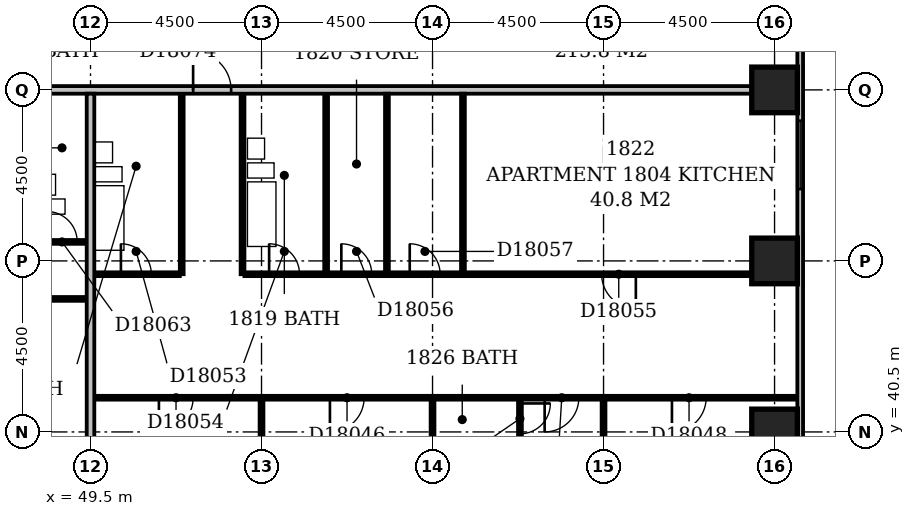
"""IFC4 building model, lengths in metres.
Left out: names, types, materials, properties, quantities, classifications, styles, units other than length and angle.
Written with IfcOpenShell. Run it as: python <this file> out.ifc"""

import sys

from ifc_helpers import new_model, si_unit, direction, frame, frame_2d, origin, origin_2d, place, context, subcontext, project, spatial, rectangle, extrude, element, fill, save


model = new_model("IFC4")
c1 = context("Model", 3, precision=1e-05, world=origin(), true_north=direction((0.0, 1.0)))
c2 = subcontext(c1, "Body", "Model", "MODEL_VIEW")
j1 = project(units=[si_unit("LENGTHUNIT", "METRE"), si_unit("PLANEANGLEUNIT", "RADIAN")], contexts=[c1])
p1 = place(None, origin())
s1 = spatial("IfcSite", under=j1, at=p1, CompositionType="ELEMENT")
p2 = place(p1, origin())
s2 = spatial("IfcBuilding", under=s1, at=p2, CompositionType="ELEMENT")
p3 = place(p2, frame((0.0, 0.0, 75.8)))
s3 = spatial("IfcBuildingStorey", under=s2, at=p3, CompositionType="ELEMENT", Elevation=75.8)
for number, where, z_axis, x_axis in (
    (1, (67.5, 40.5, -0.3), (0.0, 0.0, 1.0), (1.0, 0.0, 0.0)),
    (2, (67.5, 45.0, -0.3), (0.0, 0.0, 1.0), (1.0, 0.0, 0.0)),
    (3, (67.5, 49.5, -0.3), (0.0, 0.0, 1.0), (1.0, 0.0, 0.0)),
):
    element("IfcColumn", number, at=place(p3, frame(where, z_axis=z_axis, x_axis=x_axis)), inside=s3, PredefinedType="COLUMN", context=c2, shape_type="SweptSolid", body=[
        extrude(rectangle(XDim=1.2, YDim=1.2, at=origin_2d()), origin(), (0.0, 0.0, 1.0), 3.6),
    ])
p4 = place(p3, frame((68.175, 35.4, 0.0), z_axis=(0.0, 0.0, 1.0), x_axis=(0.0, 1.0, 0.0)))
e4 = element("IfcWall", 4, at=p4, inside=s3, PredefinedType="STANDARD", context=c2, shape_type="SweptSolid", body=[
    extrude(rectangle(XDim=23.85, YDim=0.15, at=frame_2d((11.925, 0.0))), origin(), (0.0, 0.0, 1.0), 2.7),
])
p5 = place(p4, frame((1.65, 0.0, 0.6)))
e5 = element("IfcOpeningElement", 5, at=p5, cuts=e4, PredefinedType="OPENING", context=c2, shape_type="SweptSolid", body=[
    extrude(rectangle(XDim=2.4, YDim=1.8, at=frame_2d((1.2, 0.9))), frame((0.0, 0.087, 0.0), z_axis=(0.0, -1.0, 0.0), x_axis=(1.0, 0.0, 0.0)), (0.0, 0.0, 1.0), 0.174),
])
p6 = place(p4, frame((11.49, 0.0, 0.6)))
e6 = element("IfcOpeningElement", 6, at=p6, cuts=e4, PredefinedType="OPENING", context=c2, shape_type="SweptSolid", body=[
    extrude(rectangle(XDim=1.8, YDim=1.8, at=frame_2d((0.9, 0.9))), frame((0.0, 0.087, 0.0), z_axis=(0.0, -1.0, 0.0), x_axis=(1.0, 0.0, 0.0)), (0.0, 0.0, 1.0), 0.174),
])
p7 = place(p4, frame((19.65, 0.0, 0.6)))
e7 = element("IfcOpeningElement", 7, at=p7, cuts=e4, PredefinedType="OPENING", context=c2, shape_type="SweptSolid", body=[
    extrude(rectangle(XDim=2.4, YDim=1.8, at=frame_2d((1.2, 0.9))), frame((0.0, 0.087, 0.0), z_axis=(0.0, -1.0, 0.0), x_axis=(1.0, 0.0, 0.0)), (0.0, 0.0, 1.0), 0.174),
])
p8 = place(p3, frame((49.5, 36.6, 0.0), z_axis=(0.0, 0.0, 1.0), x_axis=(0.0, 1.0, 0.0)))
e8 = element("IfcWall", 8, at=p8, inside=s3, PredefinedType="PARTITIONING", context=c2, shape_type="SweptSolid", body=[
    extrude(rectangle(XDim=12.8, YDim=0.2, at=frame_2d((6.4, 0.0))), origin(), (0.0, 0.0, 1.0), 3.3),
])
p9 = place(p3, frame((54.0, 36.6, 0.0), z_axis=(0.0, 0.0, 1.0), x_axis=(0.0, 1.0, 0.0)))
e9 = element("IfcWall", 9, at=p9, inside=s3, PredefinedType="PARTITIONING", context=c2, shape_type="SweptSolid", body=[
    extrude(rectangle(XDim=4.75, YDim=0.1, at=frame_2d((2.375, 0.0))), origin(), (0.0, 0.0, 1.0), 2.6),
])
p10 = place(p3, frame((58.5, 36.6, 0.0), z_axis=(0.0, 0.0, 1.0), x_axis=(0.0, 1.0, 0.0)))
e10 = element("IfcWall", 10, at=p10, inside=s3, PredefinedType="PARTITIONING", context=c2, shape_type="SweptSolid", body=[
    extrude(rectangle(XDim=4.75, YDim=0.1, at=frame_2d((2.375, 0.0))), origin(), (0.0, 0.0, 1.0), 3.3),
])
p11 = place(p3, frame((63.0, 36.6, 0.0), z_axis=(0.0, 0.0, 1.0), x_axis=(0.0, 1.0, 0.0)))
e11 = element("IfcWall", 11, at=p11, inside=s3, PredefinedType="PARTITIONING", context=c2, shape_type="SweptSolid", body=[
    extrude(rectangle(XDim=4.75, YDim=0.1, at=frame_2d((2.375, 0.0))), origin(), (0.0, 0.0, 1.0), 2.4),
])
p12 = place(p3, frame((60.8, 40.25, 0.0), z_axis=(0.0, 0.0, 1.0), x_axis=(0.0, 1.0, 0.0)))
e12 = element("IfcWall", 12, at=p12, inside=s3, PredefinedType="PLUMBINGWALL", context=c2, shape_type="SweptSolid", body=[
    extrude(rectangle(XDim=1.1, YDim=0.1, at=frame_2d((0.55, 0.0))), origin(), (0.0, 0.0, 1.0), 3.3),
])
p13 = place(p12, frame((0.2, 0.0, 0.0)))
e13 = element("IfcOpeningElement", 13, at=p13, cuts=e12, PredefinedType="OPENING", context=c2, shape_type="SweptSolid", body=[
    extrude(rectangle(XDim=0.8, YDim=2.1, at=frame_2d((0.4, 1.05))), frame((0.0, 0.062, 0.0), z_axis=(0.0, -1.0, 0.0), x_axis=(1.0, 0.0, 0.0)), (0.0, 0.0, 1.0), 0.124),
])
p14 = place(p3, frame((49.6, 41.4, 0.0), z_axis=(0.0, 0.0, 1.0), x_axis=(1.0, 0.0, 0.0)))
e14 = element("IfcWall", 14, at=p14, inside=s3, PredefinedType="PARTITIONING", context=c2, shape_type="SweptSolid", body=[
    extrude(rectangle(XDim=18.5, YDim=0.1, at=frame_2d((9.25, 0.0))), origin(), (0.0, 0.0, 1.0), 3.3),
])
p15 = place(p14, frame((1.7, 0.0, 0.0)))
e15 = element("IfcOpeningElement", 15, at=p15, cuts=e14, PredefinedType="OPENING", context=c2, shape_type="SweptSolid", body=[
    extrude(rectangle(XDim=0.9, YDim=2.1, at=frame_2d((0.45, 1.05))), frame((0.0, 0.062, 0.0), z_axis=(0.0, -1.0, 0.0), x_axis=(1.0, 0.0, 0.0)), (0.0, 0.0, 1.0), 0.124),
])
p16 = place(p14, frame((6.2, 0.0, 0.0)))
e16 = element("IfcOpeningElement", 16, at=p16, cuts=e14, PredefinedType="OPENING", context=c2, shape_type="SweptSolid", body=[
    extrude(rectangle(XDim=0.9, YDim=2.1, at=frame_2d((0.45, 1.05))), frame((0.0, 0.062, 0.0), z_axis=(0.0, -1.0, 0.0), x_axis=(1.0, 0.0, 0.0)), (0.0, 0.0, 1.0), 0.124),
])
p17 = place(p14, frame((11.85, 0.0, 0.0)))
e17 = element("IfcOpeningElement", 17, at=p17, cuts=e14, PredefinedType="OPENING", context=c2, shape_type="SweptSolid", body=[
    extrude(rectangle(XDim=0.9, YDim=2.1, at=frame_2d((0.45, 1.05))), frame((0.0, 0.062, 0.0), z_axis=(0.0, -1.0, 0.0), x_axis=(1.0, 0.0, 0.0)), (0.0, 0.0, 1.0), 0.124),
])
p18 = place(p14, frame((15.2, 0.0, 0.0)))
e18 = element("IfcOpeningElement", 18, at=p18, cuts=e14, PredefinedType="OPENING", context=c2, shape_type="SweptSolid", body=[
    extrude(rectangle(XDim=0.9, YDim=2.1, at=frame_2d((0.45, 1.05))), frame((0.0, 0.062, 0.0), z_axis=(0.0, -1.0, 0.0), x_axis=(1.0, 0.0, 0.0)), (0.0, 0.0, 1.0), 0.124),
])
p19 = place(p3, frame((36.1, 44.0, 0.0), z_axis=(0.0, 0.0, 1.0), x_axis=(1.0, 0.0, 0.0)))
e19 = element("IfcWall", 19, at=p19, inside=s3, PredefinedType="PARTITIONING", context=c2, shape_type="SweptSolid", body=[
    extrude(rectangle(XDim=13.3, YDim=0.1, at=frame_2d((6.65, 0.0))), origin(), (0.0, 0.0, 1.0), 3.3),
])
p20 = place(p19, frame((3.9, 0.0, 0.0)))
e20 = element("IfcOpeningElement", 20, at=p20, cuts=e19, PredefinedType="OPENING", context=c2, shape_type="SweptSolid", body=[
    extrude(rectangle(XDim=0.9, YDim=2.1, at=frame_2d((0.45, 1.05))), frame((0.0, 0.062, 0.0), z_axis=(0.0, -1.0, 0.0), x_axis=(1.0, 0.0, 0.0)), (0.0, 0.0, 1.0), 0.124),
])
p21 = place(p19, frame((10.7, 0.0, 0.0)))
e21 = element("IfcOpeningElement", 21, at=p21, cuts=e19, PredefinedType="OPENING", context=c2, shape_type="SweptSolid", body=[
    extrude(rectangle(XDim=0.9, YDim=2.1, at=frame_2d((0.45, 1.05))), frame((0.0, 0.062, 0.0), z_axis=(0.0, -1.0, 0.0), x_axis=(1.0, 0.0, 0.0)), (0.0, 0.0, 1.0), 0.124),
])
p22 = place(p3, frame((49.6, 44.65, 0.0), z_axis=(0.0, 0.0, 1.0), x_axis=(1.0, 0.0, 0.0)))
e22 = element("IfcWall", 22, at=p22, inside=s3, PredefinedType="PARTITIONING", context=c2, shape_type="SweptSolid", body=[
    extrude(rectangle(XDim=2.25, YDim=0.1, at=frame_2d((1.125, 0.0))), origin(), (0.0, 0.0, 1.0), 3.3),
])
p23 = place(p22, frame((0.7, 0.0, 0.0)))
e23 = element("IfcOpeningElement", 23, at=p23, cuts=e22, PredefinedType="OPENING", context=c2, shape_type="SweptSolid", body=[
    extrude(rectangle(XDim=0.8, YDim=2.1, at=frame_2d((0.4, 1.05))), frame((0.0, 0.062, 0.0), z_axis=(0.0, -1.0, 0.0), x_axis=(1.0, 0.0, 0.0)), (0.0, 0.0, 1.0), 0.124),
])
p24 = place(p3, frame((51.9, 44.65, 0.0), z_axis=(0.0, 0.0, 1.0), x_axis=(0.0, 1.0, 0.0)))
e24 = element("IfcWall", 24, at=p24, inside=s3, PredefinedType="PLUMBINGWALL", context=c2, shape_type="SweptSolid", body=[
    extrude(rectangle(XDim=4.75, YDim=0.1, at=frame_2d((2.375, 0.0))), origin(), (0.0, 0.0, 1.0), 3.3),
])
p25 = place(p3, frame((53.5, 44.65, 0.0), z_axis=(0.0, 0.0, 1.0), x_axis=(0.0, 1.0, 0.0)))
e25 = element("IfcWall", 25, at=p25, inside=s3, PredefinedType="PLUMBINGWALL", context=c2, shape_type="SweptSolid", body=[
    extrude(rectangle(XDim=4.75, YDim=0.1, at=frame_2d((2.375, 0.0))), origin(), (0.0, 0.0, 1.0), 2.6),
])
p26 = place(p3, frame((53.55, 44.65, 0.0), z_axis=(0.0, 0.0, 1.0), x_axis=(1.0, 0.0, 0.0)))
e26 = element("IfcWall", 26, at=p26, inside=s3, PredefinedType="PARTITIONING", context=c2, shape_type="SweptSolid", body=[
    extrude(rectangle(XDim=13.35, YDim=0.1, at=frame_2d((6.675, 0.0))), origin(), (0.0, 0.0, 1.0), 3.3),
])
p27 = place(p26, frame((0.65, 0.0, 0.0)))
e27 = element("IfcOpeningElement", 27, at=p27, cuts=e26, PredefinedType="OPENING", context=c2, shape_type="SweptSolid", body=[
    extrude(rectangle(XDim=0.8, YDim=2.1, at=frame_2d((0.4, 1.05))), frame((0.0, 0.062, 0.0), z_axis=(0.0, -1.0, 0.0), x_axis=(1.0, 0.0, 0.0)), (0.0, 0.0, 1.0), 0.124),
])
p28 = place(p26, frame((9.4, 0.0, 0.0)))
e28 = element("IfcOpeningElement", 28, at=p28, cuts=e26, PredefinedType="OPENING", context=c2, shape_type="SweptSolid", body=[
    extrude(rectangle(XDim=0.9, YDim=2.1, at=frame_2d((0.45, 1.05))), frame((0.0, 0.062, 0.0), z_axis=(0.0, -1.0, 0.0), x_axis=(1.0, 0.0, 0.0)), (0.0, 0.0, 1.0), 0.124),
])
p29 = place(p26, frame((2.55, 0.0, 0.0)))
e29 = element("IfcOpeningElement", 29, at=p29, cuts=e26, PredefinedType="OPENING", context=c2, shape_type="SweptSolid", body=[
    extrude(rectangle(XDim=0.8, YDim=2.1, at=frame_2d((0.4, 1.05))), frame((0.0, 0.062, 0.0), z_axis=(0.0, -1.0, 0.0), x_axis=(1.0, 0.0, 0.0)), (0.0, 0.0, 1.0), 0.124),
])
p30 = place(p26, frame((4.35, 0.0, 0.0)))
e30 = element("IfcOpeningElement", 30, at=p30, cuts=e26, PredefinedType="OPENING", context=c2, shape_type="SweptSolid", body=[
    extrude(rectangle(XDim=0.8, YDim=2.1, at=frame_2d((0.4, 1.05))), frame((0.0, 0.062, 0.0), z_axis=(0.0, -1.0, 0.0), x_axis=(1.0, 0.0, 0.0)), (0.0, 0.0, 1.0), 0.124),
])
p31 = place(p3, frame((55.7, 44.7, 0.0), z_axis=(0.0, 0.0, 1.0), x_axis=(0.0, 1.0, 0.0)))
e31 = element("IfcWall", 31, at=p31, inside=s3, PredefinedType="PLUMBINGWALL", context=c2, shape_type="SweptSolid", body=[
    extrude(rectangle(XDim=4.7, YDim=0.1, at=frame_2d((2.35, 0.0))), origin(), (0.0, 0.0, 1.0), 3.3),
])
for number, where, z_axis, x_axis in (
    (32, (57.3, 44.7, 0.0), (0.0, 0.0, 1.0), (0.0, 1.0, 0.0)),
    (33, (59.3, 44.7, 0.0), (0.0, 0.0, 1.0), (0.0, 1.0, 0.0)),
):
    element("IfcWall", number, at=place(p3, frame(where, z_axis=z_axis, x_axis=x_axis)), inside=s3, PredefinedType="PARTITIONING", context=c2, shape_type="SweptSolid", body=[
        extrude(rectangle(XDim=4.7, YDim=0.1, at=frame_2d((2.35, 0.0))), origin(), (0.0, 0.0, 1.0), 3.3),
    ])
p32 = place(p3, frame((37.65, 45.5, 0.0), z_axis=(0.0, 0.0, 1.0), x_axis=(1.0, 0.0, 0.0)))
e34 = element("IfcWall", 34, at=p32, inside=s3, PredefinedType="PARTITIONING", context=c2, shape_type="SweptSolid", body=[
    extrude(rectangle(XDim=11.75, YDim=0.1, at=frame_2d((5.875, 0.0))), origin(), (0.0, 0.0, 1.0), 3.3),
])
p33 = place(p32, frame((8.75, 0.0, 0.0)))
e35 = element("IfcOpeningElement", 35, at=p33, cuts=e34, PredefinedType="OPENING", context=c2, shape_type="SweptSolid", body=[
    extrude(rectangle(XDim=0.8, YDim=2.1, at=frame_2d((0.4, 1.05))), frame((0.0, 0.062, 0.0), z_axis=(0.0, -1.0, 0.0), x_axis=(1.0, 0.0, 0.0)), (0.0, 0.0, 1.0), 0.124),
])
p34 = place(p32, frame((3.5, 0.0, 0.0)))
e36 = element("IfcOpeningElement", 36, at=p34, cuts=e34, PredefinedType="OPENING", context=c2, shape_type="SweptSolid", body=[
    extrude(rectangle(XDim=0.9, YDim=2.1, at=frame_2d((0.45, 1.05))), frame((0.0, 0.062, 0.0), z_axis=(0.0, -1.0, 0.0), x_axis=(1.0, 0.0, 0.0)), (0.0, 0.0, 1.0), 0.124),
])
p35 = place(p32, frame((10.7, 0.0, 0.0)))
e37 = element("IfcOpeningElement", 37, at=p35, cuts=e34, PredefinedType="OPENING", context=c2, shape_type="SweptSolid", body=[
    extrude(rectangle(XDim=0.8, YDim=2.1, at=frame_2d((0.4, 1.05))), frame((0.0, 0.062, 0.0), z_axis=(0.0, -1.0, 0.0), x_axis=(1.0, 0.0, 0.0)), (0.0, 0.0, 1.0), 0.124),
])
p36 = place(p3, frame((9.1, 49.5, 0.0), z_axis=(0.0, 0.0, 1.0), x_axis=(1.0, 0.0, 0.0)))
e38 = element("IfcWall", 38, at=p36, inside=s3, PredefinedType="PARTITIONING", context=c2, shape_type="SweptSolid", body=[
    extrude(rectangle(XDim=57.8, YDim=0.2, at=frame_2d((28.9, 0.0))), origin(), (0.0, 0.0, 1.0), 3.3),
])
p37 = place(p36, frame((18.7, 0.0, 0.0)))
e39 = element("IfcOpeningElement", 39, at=p37, cuts=e38, PredefinedType="OPENING", context=c2, shape_type="SweptSolid", body=[
    extrude(rectangle(XDim=1.0, YDim=2.1, at=frame_2d((0.5, 1.05))), frame((0.0, 0.112, 0.0), z_axis=(0.0, -1.0, 0.0), x_axis=(1.0, 0.0, 0.0)), (0.0, 0.0, 1.0), 0.224),
])
p38 = place(p36, frame((24.35, 0.0, 0.0)))
e40 = element("IfcOpeningElement", 40, at=p38, cuts=e38, PredefinedType="OPENING", context=c2, shape_type="SweptSolid", body=[
    extrude(rectangle(XDim=1.0, YDim=2.1, at=frame_2d((0.5, 1.05))), frame((0.0, 0.112, 0.0), z_axis=(0.0, -1.0, 0.0), x_axis=(1.0, 0.0, 0.0)), (0.0, 0.0, 1.0), 0.224),
])
p39 = place(p36, frame((27.2, 0.0, 0.0)))
e41 = element("IfcOpeningElement", 41, at=p39, cuts=e38, PredefinedType="OPENING", context=c2, shape_type="SweptSolid", body=[
    extrude(rectangle(XDim=1.0, YDim=2.1, at=frame_2d((0.5, 1.05))), frame((0.0, 0.112, 0.0), z_axis=(0.0, -1.0, 0.0), x_axis=(1.0, 0.0, 0.0)), (0.0, 0.0, 1.0), 0.224),
])
p40 = place(p36, frame((43.1, 0.0, 0.0)))
e42 = element("IfcOpeningElement", 42, at=p40, cuts=e38, PredefinedType="OPENING", context=c2, shape_type="SweptSolid", body=[
    extrude(rectangle(XDim=1.0, YDim=2.1, at=frame_2d((0.5, 1.05))), frame((0.0, 0.112, 0.0), z_axis=(0.0, -1.0, 0.0), x_axis=(1.0, 0.0, 0.0)), (0.0, 0.0, 1.0), 0.224),
])
p41 = place(p36, frame((3.9, 0.0, 0.0)))
e43 = element("IfcOpeningElement", 43, at=p41, cuts=e38, PredefinedType="OPENING", context=c2, shape_type="SweptSolid", body=[
    extrude(rectangle(XDim=0.9, YDim=2.1, at=frame_2d((0.45, 1.05))), frame((0.0, 0.112, 0.0), z_axis=(0.0, -1.0, 0.0), x_axis=(1.0, 0.0, 0.0)), (0.0, 0.0, 1.0), 0.224),
])
p42 = place(p6, origin())
e44 = element("IfcWindow", 44, at=p42, inside=s3, PartitioningType="SINGLE_PANEL", PredefinedType="WINDOW", context=c2, shape_type="SweptSolid", body=[
    extrude(rectangle(XDim=1.8, YDim=1.8, at=frame_2d((0.9, 0.9))), frame((0.0, 0.03, 0.0), z_axis=(0.0, -1.0, 0.0), x_axis=(1.0, 0.0, 0.0)), (0.0, 0.0, 1.0), 0.06),
])
fill(e6, e44)
p43 = place(p13, origin())
e45 = element("IfcDoor", 45, at=p43, inside=s3, OperationType="SINGLE_SWING_RIGHT", PredefinedType="DOOR", context=c2, shape_type="SweptSolid", body=[
    extrude(rectangle(XDim=0.8, YDim=2.1, at=frame_2d((0.4, 1.05))), frame((0.0, 0.025, 0.0), z_axis=(0.0, -1.0, 0.0), x_axis=(1.0, 0.0, 0.0)), (0.0, 0.0, 1.0), 0.05),
])
fill(e13, e45)
p44 = place(p15, frame((0.9, 0.0, 0.0), z_axis=(0.0, 0.0, 1.0), x_axis=(-1.0, 0.0, 0.0)))
e46 = element("IfcDoor", 46, at=p44, inside=s3, OperationType="SINGLE_SWING_RIGHT", PredefinedType="DOOR", context=c2, shape_type="SweptSolid", body=[
    extrude(rectangle(XDim=0.9, YDim=2.1, at=frame_2d((0.45, 1.05))), frame((0.0, 0.025, 0.0), z_axis=(0.0, -1.0, 0.0), x_axis=(1.0, 0.0, 0.0)), (0.0, 0.0, 1.0), 0.05),
])
fill(e15, e46)
p45 = place(p16, frame((0.9, 0.0, 0.0), z_axis=(0.0, 0.0, 1.0), x_axis=(-1.0, 0.0, 0.0)))
e47 = element("IfcDoor", 47, at=p45, inside=s3, OperationType="SINGLE_SWING_RIGHT", PredefinedType="DOOR", context=c2, shape_type="SweptSolid", body=[
    extrude(rectangle(XDim=0.9, YDim=2.1, at=frame_2d((0.45, 1.05))), frame((0.0, 0.025, 0.0), z_axis=(0.0, -1.0, 0.0), x_axis=(1.0, 0.0, 0.0)), (0.0, 0.0, 1.0), 0.05),
])
fill(e16, e47)
p46 = place(p17, frame((0.9, 0.0, 0.0), z_axis=(0.0, 0.0, 1.0), x_axis=(-1.0, 0.0, 0.0)))
e48 = element("IfcDoor", 48, at=p46, inside=s3, OperationType="SINGLE_SWING_RIGHT", PredefinedType="DOOR", context=c2, shape_type="SweptSolid", body=[
    extrude(rectangle(XDim=0.9, YDim=2.1, at=frame_2d((0.45, 1.05))), frame((0.0, 0.025, 0.0), z_axis=(0.0, -1.0, 0.0), x_axis=(1.0, 0.0, 0.0)), (0.0, 0.0, 1.0), 0.05),
])
fill(e17, e48)
p47 = place(p18, frame((0.9, 0.0, 0.0), z_axis=(0.0, 0.0, 1.0), x_axis=(-1.0, 0.0, 0.0)))
e49 = element("IfcDoor", 49, at=p47, inside=s3, OperationType="SINGLE_SWING_RIGHT", PredefinedType="DOOR", context=c2, shape_type="SweptSolid", body=[
    extrude(rectangle(XDim=0.9, YDim=2.1, at=frame_2d((0.45, 1.05))), frame((0.0, 0.025, 0.0), z_axis=(0.0, -1.0, 0.0), x_axis=(1.0, 0.0, 0.0)), (0.0, 0.0, 1.0), 0.05),
])
fill(e18, e49)
p48 = place(p23, origin())
e50 = element("IfcDoor", 50, at=p48, inside=s3, OperationType="SINGLE_SWING_LEFT", PredefinedType="DOOR", context=c2, shape_type="SweptSolid", body=[
    extrude(rectangle(XDim=0.8, YDim=2.1, at=frame_2d((0.4, 1.05))), frame((0.0, 0.025, 0.0), z_axis=(0.0, -1.0, 0.0), x_axis=(1.0, 0.0, 0.0)), (0.0, 0.0, 1.0), 0.05),
])
fill(e23, e50)
p49 = place(p27, origin())
e51 = element("IfcDoor", 51, at=p49, inside=s3, OperationType="SINGLE_SWING_LEFT", PredefinedType="DOOR", context=c2, shape_type="SweptSolid", body=[
    extrude(rectangle(XDim=0.8, YDim=2.1, at=frame_2d((0.4, 1.05))), frame((0.0, 0.025, 0.0), z_axis=(0.0, -1.0, 0.0), x_axis=(1.0, 0.0, 0.0)), (0.0, 0.0, 1.0), 0.05),
])
fill(e27, e51)
p50 = place(p28, origin())
e52 = element("IfcDoor", 52, at=p50, inside=s3, OperationType="SINGLE_SWING_RIGHT", PredefinedType="DOOR", context=c2, shape_type="SweptSolid", body=[
    extrude(rectangle(XDim=0.9, YDim=2.1, at=frame_2d((0.45, 1.05))), frame((0.0, 0.025, 0.0), z_axis=(0.0, -1.0, 0.0), x_axis=(1.0, 0.0, 0.0)), (0.0, 0.0, 1.0), 0.05),
])
fill(e28, e52)
p51 = place(p29, origin())
e53 = element("IfcDoor", 53, at=p51, inside=s3, OperationType="SINGLE_SWING_LEFT", PredefinedType="DOOR", context=c2, shape_type="SweptSolid", body=[
    extrude(rectangle(XDim=0.8, YDim=2.1, at=frame_2d((0.4, 1.05))), frame((0.0, 0.025, 0.0), z_axis=(0.0, -1.0, 0.0), x_axis=(1.0, 0.0, 0.0)), (0.0, 0.0, 1.0), 0.05),
])
fill(e29, e53)
p52 = place(p30, origin())
e54 = element("IfcDoor", 54, at=p52, inside=s3, OperationType="SINGLE_SWING_LEFT", PredefinedType="DOOR", context=c2, shape_type="SweptSolid", body=[
    extrude(rectangle(XDim=0.8, YDim=2.1, at=frame_2d((0.4, 1.05))), frame((0.0, 0.025, 0.0), z_axis=(0.0, -1.0, 0.0), x_axis=(1.0, 0.0, 0.0)), (0.0, 0.0, 1.0), 0.05),
])
fill(e30, e54)
p53 = place(p35, origin())
e55 = element("IfcDoor", 55, at=p53, inside=s3, OperationType="SINGLE_SWING_LEFT", PredefinedType="DOOR", context=c2, shape_type="SweptSolid", body=[
    extrude(rectangle(XDim=0.8, YDim=2.1, at=frame_2d((0.4, 1.05))), frame((0.0, 0.025, 0.0), z_axis=(0.0, -1.0, 0.0), x_axis=(1.0, 0.0, 0.0)), (0.0, 0.0, 1.0), 0.05),
])
fill(e37, e55)
p54 = place(p40, origin())
e56 = element("IfcDoor", 56, at=p54, inside=s3, OperationType="SINGLE_SWING_LEFT", PredefinedType="DOOR", context=c2, shape_type="SweptSolid", body=[
    extrude(rectangle(XDim=1.0, YDim=2.1, at=frame_2d((0.5, 1.05))), frame((0.0, 0.025, 0.0), z_axis=(0.0, -1.0, 0.0), x_axis=(1.0, 0.0, 0.0)), (0.0, 0.0, 1.0), 0.05),
])
fill(e42, e56)
save(model, sys.argv[1])
